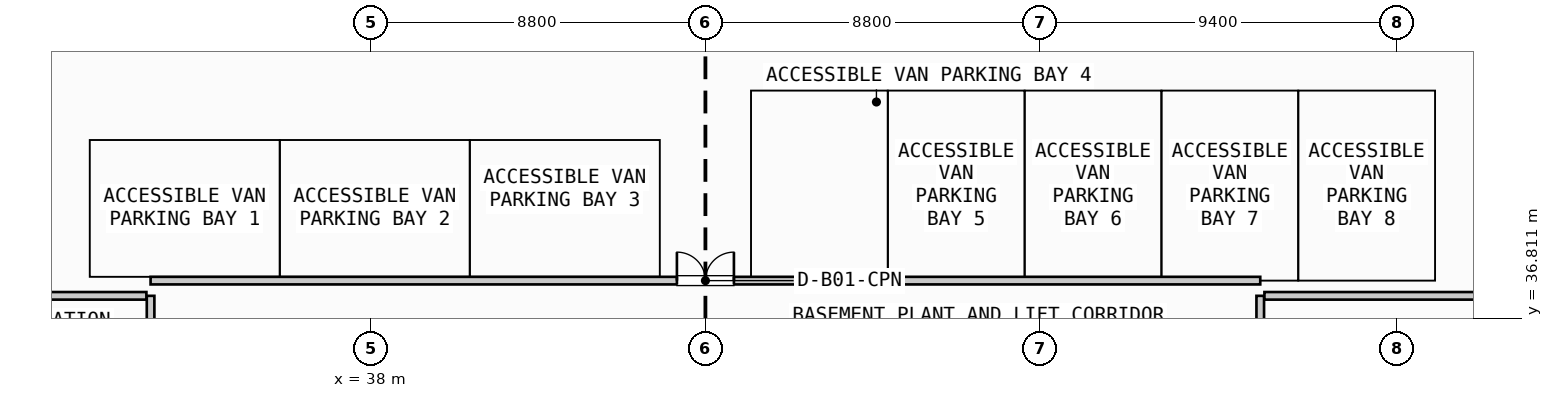
"""IFC4 building model, lengths in metres.
Left out: names, types, materials, properties, quantities, classifications, styles, units other than length and angle.
Written with IfcOpenShell. Run it as: python <this file> out.ifc"""

import sys

from ifc_helpers import new_model, si_unit, direction, frame, frame_2d, origin, place, context, subcontext, project, spatial, rectangle, extrude, source, transform, mapped, element, fill, save


model = new_model("IFC4")
c1 = context("Model", 3, precision=1e-05, world=origin(), true_north=direction((0.0, 1.0)))
c2 = subcontext(c1, "Body", "Model", "MODEL_VIEW")
j1 = project(units=[si_unit("LENGTHUNIT", "METRE"), si_unit("PLANEANGLEUNIT", "RADIAN")], contexts=[c1])
p1 = place(None, origin())
s1 = spatial("IfcSite", under=j1, at=p1, CompositionType="ELEMENT")
p2 = place(p1, origin())
s2 = spatial("IfcBuilding", under=s1, at=p2, CompositionType="ELEMENT")
p3 = place(p2, frame((0.0, 0.0, -4.5)))
s3 = spatial("IfcBuildingStorey", under=s2, at=p3, CompositionType="ELEMENT", Elevation=-4.5)
p4 = place(p3, frame((32.2, 28.2, 0.0), z_axis=(0.0, 0.0, 1.0), x_axis=(0.0, 1.0, 0.0)))
e1 = element("IfcWall", 1, at=p4, inside=s3, PredefinedType="PARTITIONING", context=c2, shape_type="SweptSolid", body=[
    extrude(rectangle(XDim=9.2, YDim=0.2, at=frame_2d((4.6, 0.0))), origin(), (0.0, 0.0, 1.0), 3.463),
])
p5 = place(p4, frame((4.05, 0.0, 0.0)))
e2 = element("IfcOpeningElement", 2, at=p5, cuts=e1, PredefinedType="OPENING", context=c2, shape_type="SweptSolid", body=[
    extrude(rectangle(XDim=1.1, YDim=2.15, at=frame_2d((0.55, 1.075))), frame((0.0, 0.11, 0.0), z_axis=(0.0, -1.0, 0.0), x_axis=(1.0, 0.0, 0.0)), (0.0, 0.0, 1.0), 0.22),
])
p6 = place(p3, frame((26.31, 37.4, 0.0), z_axis=(0.0, 0.0, 1.0), x_axis=(1.0, 0.0, 0.0)))
e3 = element("IfcWall", 3, at=p6, inside=s3, PredefinedType="PARTITIONING", context=c2, shape_type="SweptSolid", body=[
    extrude(rectangle(XDim=5.78, YDim=0.2, at=frame_2d((2.89, 0.0))), origin(), (0.0, 0.0, 1.0), 3.463),
])
p7 = place(p3, frame((61.4, 28.2, 0.0), z_axis=(0.0, 0.0, 1.0), x_axis=(0.0, 1.0, 0.0)))
e4 = element("IfcWall", 4, at=p7, inside=s3, PredefinedType="PARTITIONING", context=c2, shape_type="SweptSolid", body=[
    extrude(rectangle(XDim=9.2, YDim=0.2, at=frame_2d((4.6, 0.0))), origin(), (0.0, 0.0, 1.0), 3.463),
])
p8 = place(p7, frame((4.05, 0.0, 0.0)))
e5 = element("IfcOpeningElement", 5, at=p8, cuts=e4, PredefinedType="OPENING", context=c2, shape_type="SweptSolid", body=[
    extrude(rectangle(XDim=1.1, YDim=2.15, at=frame_2d((0.55, 1.075))), frame((0.0, 0.11, 0.0), z_axis=(0.0, -1.0, 0.0), x_axis=(1.0, 0.0, 0.0)), (0.0, 0.0, 1.0), 0.22),
])
p9 = place(p3, frame((61.51, 37.4, 0.0), z_axis=(0.0, 0.0, 1.0), x_axis=(1.0, 0.0, 0.0)))
e6 = element("IfcWall", 6, at=p9, inside=s3, PredefinedType="PARTITIONING", context=c2, shape_type="SweptSolid", body=[
    extrude(rectangle(XDim=5.78, YDim=0.2, at=frame_2d((2.89, 0.0))), origin(), (0.0, 0.0, 1.0), 3.463),
])
p10 = place(p3, frame((32.2, 37.8, 0.0), z_axis=(0.0, 0.0, 1.0), x_axis=(1.0, 0.0, 0.0)))
e7 = element("IfcWall", 7, at=p10, inside=s3, PredefinedType="PARTITIONING", context=c2, shape_type="SweptSolid", body=[
    extrude(rectangle(XDim=29.2, YDim=0.2, at=frame_2d((14.6, 0.0))), origin(), (0.0, 0.0, 1.0), 3.463),
])
p11 = place(p10, frame((13.85, 0.0, 0.0)))
e8 = element("IfcOpeningElement", 8, at=p11, cuts=e7, PredefinedType="OPENING", context=c2, shape_type="SweptSolid", body=[
    extrude(rectangle(XDim=1.5, YDim=2.2, at=frame_2d((0.75, 1.1))), frame((0.0, 0.11, 0.0), z_axis=(0.0, -1.0, 0.0), x_axis=(1.0, 0.0, 0.0)), (0.0, 0.0, 1.0), 0.22),
])
m1 = source(origin(), c2, "Body", "SweptSolid", [
    extrude(rectangle(XDim=1.5, YDim=2.2, at=frame_2d((0.75, 1.1))), frame((0.0, 0.025, 0.0), z_axis=(0.0, -1.0, 0.0), x_axis=(1.0, 0.0, 0.0)), (0.0, 0.0, 1.0), 0.05),
])
p12 = place(p11, origin())
e9 = element("IfcDoor", 9, at=p12, inside=s3, OperationType="DOUBLE_DOOR_SINGLE_SWING", PredefinedType="DOOR", context=c2, shape_type="MappedRepresentation", body=[
    mapped(m1, transform((0.0, 0.0, 0.0), scale=1.0)),
])
fill(e8, e9)
save(model, sys.argv[1])
